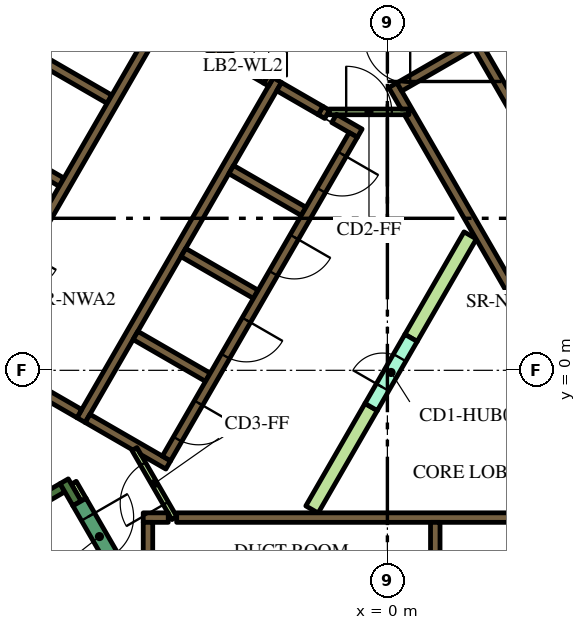
"""IFC4 building model, lengths in metres.
Left out: names, types, materials, properties, quantities, classifications, styles, units other than length and angle.
Written with IfcOpenShell. Run it as: python <this file> out.ifc"""

import sys

from ifc_helpers import new_model, si_unit, direction, frame, frame_2d, origin, place, context, subcontext, project, spatial, polyline, rectangle, outline, extrude, element, fill, save


model = new_model("IFC4")
c1 = context("Model", 3, precision=1e-05, world=origin(), true_north=direction((0.0, 1.0)))
c2 = subcontext(c1, "Body", "Model", "MODEL_VIEW")
j1 = project(units=[si_unit("LENGTHUNIT", "METRE"), si_unit("PLANEANGLEUNIT", "RADIAN")], contexts=[c1])
p1 = place(None, origin())
s1 = spatial("IfcSite", under=j1, at=p1, CompositionType="ELEMENT")
p2 = place(p1, origin())
s2 = spatial("IfcBuilding", under=s1, at=p2, CompositionType="ELEMENT")
p3 = place(p2, frame((0.0, 0.0, 31.5)))
s3 = spatial("IfcBuildingStorey", under=s2, at=p3, CompositionType="ELEMENT", Elevation=31.5)
p4 = place(p3, frame((-15.36, -1.503, 0.0), z_axis=(0.0, 0.0, 1.0), x_axis=(0.50000389221, 0.866023156604, 0.0)))
e1 = element("IfcWall", 1, at=p4, inside=s3, PredefinedType="SOLIDWALL", context=c2, shape_type="SweptSolid", body=[
    extrude(rectangle(XDim=21.0, YDim=0.9, at=frame_2d((10.5, 0.0))), origin(), (0.0, 0.0, 1.0), 3.9),
])
p5 = place(p3, frame((-14.44, -6.49, 0.0), z_axis=(0.0, 0.0, 1.0), x_axis=(0.866022966069, 0.500004222222, 0.0)))
e2 = element("IfcWall", 2, at=p5, inside=s3, PredefinedType="SOLIDWALL", context=c2, shape_type="SweptSolid", body=[
    extrude(rectangle(XDim=6.8, YDim=0.25, at=frame_2d((3.4, 0.0))), origin(), (0.0, 0.0, 1.0), 3.9),
])
p6 = place(p3, frame((-8.168, -3.503, 0.0), z_axis=(0.0, 0.0, 1.0), x_axis=(-0.499952099219, 0.866053057547, 0.0)))
e3 = element("IfcWall", 3, at=p6, inside=s3, PredefinedType="SOLIDWALL", context=c2, shape_type="SweptSolid", body=[
    extrude(rectangle(XDim=0.675, YDim=0.25, at=frame_2d((0.337, 0.0))), origin(), (0.0, 0.0, 1.0), 3.9),
])
p7 = place(p3, frame((-5.545, -3.875, 0.0), z_axis=(0.0, 0.0, 1.0), x_axis=(1.0, 0.0, 0.0)))
e4 = element("IfcWall", 4, at=p7, inside=s3, PredefinedType="SOLIDWALL", context=c2, shape_type="SweptSolid", body=[
    extrude(rectangle(XDim=11.97, YDim=0.25, at=frame_2d((5.985, 0.0))), origin(), (0.0, 0.0, 1.0), 3.9),
])
p8 = place(p3, frame((-6.425, -3.875, 0.0), z_axis=(0.0, 0.0, 1.0), x_axis=(1.0, 0.0, 0.0)))
e5 = element("IfcWall", 5, at=p8, inside=s3, PredefinedType="SOLIDWALL", context=c2, shape_type="SweptSolid", body=[
    extrude(rectangle(XDim=0.658, YDim=0.25, at=frame_2d((0.329, 0.0))), origin(), (0.0, 0.0, 1.0), 3.9),
])
p9 = place(p3, frame((1.26, -4.0, 0.0), z_axis=(0.0, 0.0, 1.0), x_axis=(0.0, -1.0, 0.0)))
e6 = element("IfcWall", 6, at=p9, inside=s3, PredefinedType="SOLIDWALL", context=c2, shape_type="SweptSolid", body=[
    extrude(rectangle(XDim=2.2, YDim=0.25, at=frame_2d((1.1, 0.0))), origin(), (0.0, 0.0, 1.0), 3.9),
])
p10 = place(p3, frame((-6.3, -4.0, 0.0), z_axis=(0.0, 0.0, 1.0), x_axis=(0.0, -1.0, 0.0)))
e7 = element("IfcWall", 7, at=p10, inside=s3, PredefinedType="SOLIDWALL", context=c2, shape_type="SweptSolid", body=[
    extrude(rectangle(XDim=3.154, YDim=0.25, at=frame_2d((1.577, 0.0))), origin(), (0.0, 0.0, 1.0), 3.9),
])
p11 = place(p3, origin())
e8 = element("IfcWall", 8, at=p11, inside=s3, PredefinedType="SOLIDWALL", context=c2, shape_type="SweptSolid", body=[
    extrude(outline(polyline([(0.566, 6.725), (0.566, 6.875), (0.566, 6.875), (0.565, 6.875), (0.361, 6.875), (0.035, 7.439), (0.252, 7.564), (0.377, 7.348), (6.552, -3.348), (6.677, -3.564), (6.46, -3.689), (0.448, 6.725), (0.565, 6.725), (0.566, 6.725), (0.566, 6.725)])), origin(), (0.0, 0.0, 1.0), 3.9),
])
p12 = place(p3, frame((0.314, 7.456, 0.0), z_axis=(0.0, 0.0, 1.0), x_axis=(0.866013897511, 0.50001992892, 0.0)))
e9 = element("IfcWall", 9, at=p12, inside=s3, PredefinedType="SOLIDWALL", context=c2, shape_type="SweptSolid", body=[
    extrude(rectangle(XDim=3.268, YDim=0.25, at=frame_2d((1.634, 0.0))), origin(), (0.0, 0.0, 1.0), 3.9),
])
p13 = place(p3, frame((-8.06, -1.311, 0.0), z_axis=(0.0, 0.0, 1.0), x_axis=(0.50000273126, 0.866023826885, 0.0)))
e10 = element("IfcWall", 10, at=p13, inside=s3, PredefinedType="SOLIDWALL", context=c2, shape_type="SweptSolid", body=[
    extrude(rectangle(XDim=10.33, YDim=0.25, at=frame_2d((5.165, 0.0))), origin(), (0.0, 0.0, 1.0), 3.9),
])
p14 = place(p3, frame((-1.758, 6.835, 0.0), z_axis=(0.0, 0.0, 1.0), x_axis=(0.865982457891, -0.500074377092, 0.0)))
e11 = element("IfcWall", 11, at=p14, inside=s3, PredefinedType="SOLIDWALL", context=c2, shape_type="SweptSolid", body=[
    extrude(rectangle(XDim=0.2, YDim=0.25, at=frame_2d((0.1, 0.0))), origin(), (0.0, 0.0, 1.0), 3.9),
])
p15 = place(p3, frame((-1.76, 6.836, 0.0), z_axis=(0.0, 0.0, 1.0), x_axis=(-0.865952863304, 0.500125622755, 0.0)))
e12 = element("IfcWall", 12, at=p15, inside=s3, PredefinedType="SOLIDWALL", context=c2, shape_type="SweptSolid", body=[
    extrude(rectangle(XDim=1.258, YDim=0.25, at=frame_2d((0.629, 0.0))), origin(), (0.0, 0.0, 1.0), 3.9),
])
p16 = place(p3, frame((-0.728, 6.24, 0.0), z_axis=(0.0, 0.0, 1.0), x_axis=(-0.865955664968, 0.500120771724, 0.0)))
e13 = element("IfcWall", 13, at=p16, inside=s3, PredefinedType="SOLIDWALL", context=c2, shape_type="SweptSolid", body=[
    extrude(rectangle(XDim=0.778, YDim=0.25, at=frame_2d((0.389, 0.0))), origin(), (0.0, 0.0, 1.0), 3.9),
])
for number, where, z_axis, x_axis in (
    (14, (-2.204, 4.182, 0.0), (0.0, 0.0, 1.0), (-0.866, 0.5, 0.0)),
    (15, (-5.369, 3.1, 0.0), (0.0, 0.0, 1.0), (0.866, -0.5, 0.0)),
    (16, (-4.724, -0.182, 0.0), (0.0, 0.0, 1.0), (-0.866, 0.5, 0.0)),
):
    element("IfcWall", number, at=place(p3, frame(where, z_axis=z_axis, x_axis=x_axis)), inside=s3, PredefinedType="SOLIDWALL", context=c2, shape_type="SweptSolid", body=[
        extrude(rectangle(XDim=2.2, YDim=0.25, at=frame_2d((1.1, 0.0))), origin(), (0.0, 0.0, 1.0), 3.9),
    ])
e17 = element("IfcWall", 17, at=p11, inside=s3, PredefinedType="SOLIDWALL", context=c2, shape_type="SweptSolid", body=[
    extrude(outline(polyline([(-5.922, -2.257), (-5.922, -2.257), (-5.705, -2.382), (-5.83, -2.598), (-6.483, -2.221), (-6.591, -2.033), (-6.591, -2.033), (-6.7, -2.096), (-7.952, -1.373), (-7.827, -1.156), (-5.922, -2.257)])), origin(), (0.0, 0.0, 1.0), 3.9),
])
p17 = place(p3, frame((-8.106, -1.14, 0.0), z_axis=(0.0, 0.0, 1.0), x_axis=(-0.866000643155, 0.500042884217, 0.0)))
e18 = element("IfcWall", 18, at=p17, inside=s3, PredefinedType="SOLIDWALL", context=c2, shape_type="SweptSolid", body=[
    extrude(rectangle(XDim=5.65, YDim=0.25, at=frame_2d((2.825, 0.0))), origin(), (0.0, 0.0, 1.0), 3.9),
])
e19 = element("IfcWall", 19, at=p11, inside=s3, PredefinedType="SOLIDWALL", context=c2, shape_type="SweptSolid", body=[
    extrude(outline(polyline([(-3.128, 7.481), (-3.259, 7.557), (-3.134, 7.773), (-3.003, 7.698), (-3.128, 7.481)])), origin(), (0.0, 0.0, 1.0), 3.9),
])
for number, where, z_axis, x_axis in (
    (20, (-8.574, 4.95, 0.0), (0.0, 0.0, 1.0), (-0.866, 0.5, 0.0)),
    (21, (-7.314, 7.132, 0.0), (0.0, 0.0, 1.0), (-0.866, 0.5, 0.0)),
):
    element("IfcWall", number, at=place(p3, frame(where, z_axis=z_axis, x_axis=x_axis)), inside=s3, PredefinedType="SOLIDWALL", context=c2, shape_type="SweptSolid", body=[
        extrude(rectangle(XDim=2.2, YDim=0.25, at=frame_2d((1.1, 0.0))), origin(), (0.0, 0.0, 1.0), 3.9),
    ])
p18 = place(p3, frame((-7.959, 10.415, 0.0), z_axis=(0.0, 0.0, 1.0), x_axis=(0.866020958405, -0.500007699544, 0.0)))
e22 = element("IfcWall", 22, at=p18, inside=s3, PredefinedType="SOLIDWALL", context=c2, shape_type="SweptSolid", body=[
    extrude(rectangle(XDim=4.1, YDim=0.25, at=frame_2d((2.05, 0.0))), origin(), (0.0, 0.0, 1.0), 3.9),
])
p19 = place(p3, frame((-8.252, -2.958, 0.0), z_axis=(0.0, 0.0, 1.0), x_axis=(0.500174715838, -0.865924508047, 0.0)))
e23 = element("IfcWall", 23, at=p19, inside=s3, PredefinedType="PARTITIONING", context=c2, shape_type="SweptSolid", body=[
    extrude(rectangle(XDim=0.514, YDim=0.15, at=frame_2d((0.257, 0.0))), origin(), (0.0, 0.0, 1.0), 2.75),
])
e24 = element("IfcWall", 24, at=p11, inside=s3, PredefinedType="PARTITIONING", context=c2, shape_type="SweptSolid", body=[
    extrude(outline(polyline([(-0.59, -0.872), (-0.265, -1.059), (-1.822, -3.756), (-2.147, -3.568), (-0.59, -0.872)])), origin(), (0.0, 0.0, 1.0), 2.75),
])
e25 = element("IfcWall", 25, at=p11, inside=s3, PredefinedType="PARTITIONING", context=c2, shape_type="SweptSolid", body=[
    extrude(outline(polyline([(2.017, 3.643), (2.342, 3.456), (0.785, 0.76), (0.46, 0.947), (2.017, 3.643)])), origin(), (0.0, 0.0, 1.0), 2.75),
])
p20 = place(p3, frame((8.565, -2.185, 0.0), z_axis=(0.0, 0.0, 1.0), x_axis=(-0.499997954832, 0.866026584559, 0.0)))
e26 = element("IfcWall", 26, at=p20, inside=s3, PredefinedType="SOLIDWALL", context=c2, shape_type="SweptSolid", body=[
    extrude(rectangle(XDim=12.35, YDim=0.25, at=frame_2d((6.175, 0.0))), origin(), (0.0, 0.0, 1.0), 3.9),
])
p21 = place(p20, frame((5.725, 0.0, 0.0)))
e27 = element("IfcOpeningElement", 27, at=p21, cuts=e26, PredefinedType="OPENING", context=c2, shape_type="SweptSolid", body=[
    extrude(rectangle(XDim=0.9, YDim=2.1, at=frame_2d((0.45, 1.05))), frame((0.0, 0.135, 0.0), z_axis=(0.0, -1.0, 0.0), x_axis=(1.0, 0.0, 0.0)), (0.0, 0.0, 1.0), 0.27),
])
p22 = place(p3, frame((-6.008, 9.144, 0.0), z_axis=(0.0, 0.0, 1.0), x_axis=(-0.500006956611, -0.866021387346, 0.0)))
e28 = element("IfcWall", 28, at=p22, inside=s3, PredefinedType="SOLIDWALL", context=c2, shape_type="SweptSolid", body=[
    extrude(rectangle(XDim=9.83, YDim=0.25, at=frame_2d((4.915, 0.0))), origin(), (0.0, 0.0, 1.0), 3.9),
])
p23 = place(p22, frame((6.985, 0.0, 0.0)))
e29 = element("IfcOpeningElement", 29, at=p23, cuts=e28, PredefinedType="OPENING", context=c2, shape_type="SweptSolid", body=[
    extrude(rectangle(XDim=0.9, YDim=2.1, at=frame_2d((0.45, 1.05))), frame((0.0, 0.135, 0.0), z_axis=(0.0, -1.0, 0.0), x_axis=(1.0, 0.0, 0.0)), (0.0, 0.0, 1.0), 0.27),
])
p24 = place(p3, frame((-0.898, 6.194, 0.0), z_axis=(0.0, 0.0, 1.0), x_axis=(-0.499996202215, -0.866027596426, 0.0)))
e30 = element("IfcWall", 30, at=p24, inside=s3, PredefinedType="SOLIDWALL", context=c2, shape_type="SweptSolid", body=[
    extrude(rectangle(XDim=9.83, YDim=0.25, at=frame_2d((4.915, 0.0))), origin(), (0.0, 0.0, 1.0), 3.9),
])
p25 = place(p24, frame((0.585, 0.0, 0.0)))
e31 = element("IfcOpeningElement", 31, at=p25, cuts=e30, PredefinedType="OPENING", context=c2, shape_type="SweptSolid", body=[
    extrude(rectangle(XDim=1.1, YDim=2.1, at=frame_2d((0.55, 1.05))), frame((0.0, 0.135, 0.0), z_axis=(0.0, -1.0, 0.0), x_axis=(1.0, 0.0, 0.0)), (0.0, 0.0, 1.0), 0.27),
])
p26 = place(p24, frame((3.105, 0.0, 0.0)))
e32 = element("IfcOpeningElement", 32, at=p26, cuts=e30, PredefinedType="OPENING", context=c2, shape_type="SweptSolid", body=[
    extrude(rectangle(XDim=1.1, YDim=2.1, at=frame_2d((0.55, 1.05))), frame((0.0, 0.135, 0.0), z_axis=(0.0, -1.0, 0.0), x_axis=(1.0, 0.0, 0.0)), (0.0, 0.0, 1.0), 0.27),
])
p27 = place(p24, frame((5.625, 0.0, 0.0)))
e33 = element("IfcOpeningElement", 33, at=p27, cuts=e30, PredefinedType="OPENING", context=c2, shape_type="SweptSolid", body=[
    extrude(rectangle(XDim=1.1, YDim=2.1, at=frame_2d((0.55, 1.05))), frame((0.0, 0.135, 0.0), z_axis=(0.0, -1.0, 0.0), x_axis=(1.0, 0.0, 0.0)), (0.0, 0.0, 1.0), 0.27),
])
p28 = place(p24, frame((8.145, 0.0, 0.0)))
e34 = element("IfcOpeningElement", 34, at=p28, cuts=e30, PredefinedType="OPENING", context=c2, shape_type="SweptSolid", body=[
    extrude(rectangle(XDim=1.1, YDim=2.1, at=frame_2d((0.55, 1.05))), frame((0.0, 0.135, 0.0), z_axis=(0.0, -1.0, 0.0), x_axis=(1.0, 0.0, 0.0)), (0.0, 0.0, 1.0), 0.27),
])
p29 = place(p3, frame((-8.103, -3.466, 0.0), z_axis=(0.0, 0.0, 1.0), x_axis=(0.500078061341, -0.865980330357, 0.0)))
e35 = element("IfcWall", 35, at=p29, inside=s3, PredefinedType="SOLIDWALL", context=c2, shape_type="SweptSolid", body=[
    extrude(rectangle(XDim=2.1, YDim=0.4, at=frame_2d((1.05, 0.0))), origin(), (0.0, 0.0, 1.0), 3.9),
])
p30 = place(p29, frame((0.45, 0.0, 0.0)))
e36 = element("IfcOpeningElement", 36, at=p30, cuts=e35, PredefinedType="OPENING", context=c2, shape_type="SweptSolid", body=[
    extrude(rectangle(XDim=1.2, YDim=2.1, at=frame_2d((0.6, 1.05))), frame((0.0, 0.21, 0.0), z_axis=(0.0, -1.0, 0.0), x_axis=(1.0, 0.0, 0.0)), (0.0, 0.0, 1.0), 0.42),
])
p31 = place(p3, frame((-0.427, -0.966, 0.0), z_axis=(0.0, 0.0, 1.0), x_axis=(0.49994051562, 0.866059744384, 0.0)))
e37 = element("IfcWall", 37, at=p31, inside=s3, PredefinedType="PARTITIONING", context=c2, shape_type="SweptSolid", body=[
    extrude(rectangle(XDim=2.1, YDim=0.375, at=frame_2d((1.05, 0.0))), origin(), (0.0, 0.0, 1.0), 2.75),
])
p32 = place(p31, frame((0.6, 0.0, 0.0)))
e38 = element("IfcOpeningElement", 38, at=p32, cuts=e37, PredefinedType="OPENING", context=c2, shape_type="SweptSolid", body=[
    extrude(rectangle(XDim=0.9, YDim=2.1, at=frame_2d((0.45, 1.05))), frame((0.0, 0.198, 0.0), z_axis=(0.0, -1.0, 0.0), x_axis=(1.0, 0.0, 0.0)), (0.0, 0.0, 1.0), 0.395),
])
p33 = place(p3, frame((-1.534, 6.8, 0.0), z_axis=(0.0, 0.0, 1.0), x_axis=(1.0, 0.0, 0.0)))
e39 = element("IfcWall", 39, at=p33, inside=s3, PredefinedType="PARTITIONING", context=c2, shape_type="SweptSolid", body=[
    extrude(rectangle(XDim=2.1, YDim=0.15, at=frame_2d((1.05, 0.0))), origin(), (0.0, 0.0, 1.0), 2.75),
])
p34 = place(p33, frame((0.45, 0.0, 0.0)))
e40 = element("IfcOpeningElement", 40, at=p34, cuts=e39, PredefinedType="OPENING", context=c2, shape_type="SweptSolid", body=[
    extrude(rectangle(XDim=1.2, YDim=2.1, at=frame_2d((0.6, 1.05))), frame((0.0, 0.085, 0.0), z_axis=(0.0, -1.0, 0.0), x_axis=(1.0, 0.0, 0.0)), (0.0, 0.0, 1.0), 0.17),
])
p35 = place(p3, frame((-5.606, -3.89, 0.0), z_axis=(0.0, 0.0, 1.0), x_axis=(-0.500027713859, 0.866009402589, 0.0)))
e41 = element("IfcWall", 41, at=p35, inside=s3, PredefinedType="PARTITIONING", context=c2, shape_type="SweptSolid", body=[
    extrude(rectangle(XDim=2.1, YDim=0.15, at=frame_2d((1.05, 0.0))), origin(), (0.0, 0.0, 1.0), 2.75),
])
p36 = place(p35, frame((0.45, 0.0, 0.0)))
e42 = element("IfcOpeningElement", 42, at=p36, cuts=e41, PredefinedType="OPENING", context=c2, shape_type="SweptSolid", body=[
    extrude(rectangle(XDim=1.2, YDim=2.1, at=frame_2d((0.6, 1.05))), frame((0.0, 0.085, 0.0), z_axis=(0.0, -1.0, 0.0), x_axis=(1.0, 0.0, 0.0)), (0.0, 0.0, 1.0), 0.17),
])
p37 = place(p3, frame((-4.409, 8.365, 0.0), z_axis=(0.0, 0.0, 1.0), x_axis=(0.866034573852, -0.49998411664, 0.0)))
e43 = element("IfcWall", 43, at=p37, inside=s3, PredefinedType="SOLIDWALL", context=c2, shape_type="SweptSolid", body=[
    extrude(rectangle(XDim=1.4, YDim=0.25, at=frame_2d((0.7, 0.0))), origin(), (0.0, 0.0, 1.0), 3.9),
])
p38 = place(p37, frame((0.1, 0.0, 0.0)))
e44 = element("IfcOpeningElement", 44, at=p38, cuts=e43, PredefinedType="OPENING", context=c2, shape_type="SweptSolid", body=[
    extrude(rectangle(XDim=1.2, YDim=2.1, at=frame_2d((0.6, 1.05))), frame((0.0, 0.135, 0.0), z_axis=(0.0, -1.0, 0.0), x_axis=(1.0, 0.0, 0.0)), (0.0, 0.0, 1.0), 0.27),
])
p39 = place(p3, frame((-19.081, -3.9, 0.0), z_axis=(0.0, 0.0, 1.0), x_axis=(0.499998313975, 0.866026377209, 0.0)))
e45 = element("IfcWall", 45, at=p39, inside=s3, PredefinedType="PARTITIONING", context=c2, shape_type="SweptSolid", body=[
    extrude(rectangle(XDim=25.766, YDim=0.15, at=frame_2d((12.883, 0.0))), origin(), (0.0, 0.0, 1.0), 2.75),
])
p40 = place(p39, frame((24.586, 0.0, 0.0)))
e46 = element("IfcOpeningElement", 46, at=p40, cuts=e45, PredefinedType="OPENING", context=c2, shape_type="SweptSolid", body=[
    extrude(rectangle(XDim=1.0, YDim=2.1, at=frame_2d((0.5, 1.05))), frame((0.0, 0.085, 0.0), z_axis=(0.0, -1.0, 0.0), x_axis=(1.0, 0.0, 0.0)), (0.0, 0.0, 1.0), 0.17),
])
p41 = place(p39, frame((16.196, 0.0, 0.0)))
e47 = element("IfcOpeningElement", 47, at=p41, cuts=e45, PredefinedType="OPENING", context=c2, shape_type="SweptSolid", body=[
    extrude(rectangle(XDim=1.0, YDim=2.1, at=frame_2d((0.5, 1.05))), frame((0.0, 0.085, 0.0), z_axis=(0.0, -1.0, 0.0), x_axis=(1.0, 0.0, 0.0)), (0.0, 0.0, 1.0), 0.17),
])
p42 = place(p39, frame((14.789, 0.0, 0.0)))
e48 = element("IfcOpeningElement", 48, at=p42, cuts=e45, PredefinedType="OPENING", context=c2, shape_type="SweptSolid", body=[
    extrude(rectangle(XDim=1.1, YDim=2.1, at=frame_2d((0.55, 1.05))), frame((0.0, 0.085, 0.0), z_axis=(0.0, -1.0, 0.0), x_axis=(1.0, 0.0, 0.0)), (0.0, 0.0, 1.0), 0.17),
])
p43 = place(p39, frame((3.698, 0.0, 0.0)))
e49 = element("IfcOpeningElement", 49, at=p43, cuts=e45, PredefinedType="OPENING", context=c2, shape_type="SweptSolid", body=[
    extrude(rectangle(XDim=1.0, YDim=2.1, at=frame_2d((0.5, 1.05))), frame((0.0, 0.085, 0.0), z_axis=(0.0, -1.0, 0.0), x_axis=(1.0, 0.0, 0.0)), (0.0, 0.0, 1.0), 0.17),
])
p44 = place(p39, frame((1.531, 0.0, 0.0)))
e50 = element("IfcOpeningElement", 50, at=p44, cuts=e45, PredefinedType="OPENING", context=c2, shape_type="SweptSolid", body=[
    extrude(rectangle(XDim=0.9, YDim=2.1, at=frame_2d((0.45, 1.05))), frame((0.0, 0.085, 0.0), z_axis=(0.0, -1.0, 0.0), x_axis=(1.0, 0.0, 0.0)), (0.0, 0.0, 1.0), 0.17),
])
p45 = place(p25, origin())
e51 = element("IfcDoor", 51, at=p45, inside=s3, OperationType="DOUBLE_DOOR_SLIDING", PredefinedType="DOOR", context=c2, shape_type="SweptSolid", body=[
    extrude(rectangle(XDim=1.1, YDim=2.1, at=frame_2d((0.55, 1.05))), frame((0.0, 0.025, 0.0), z_axis=(0.0, -1.0, 0.0), x_axis=(1.0, 0.0, 0.0)), (0.0, 0.0, 1.0), 0.05),
])
fill(e31, e51)
p46 = place(p26, origin())
e52 = element("IfcDoor", 52, at=p46, inside=s3, OperationType="DOUBLE_DOOR_SLIDING", PredefinedType="DOOR", context=c2, shape_type="SweptSolid", body=[
    extrude(rectangle(XDim=1.1, YDim=2.1, at=frame_2d((0.55, 1.05))), frame((0.0, 0.025, 0.0), z_axis=(0.0, -1.0, 0.0), x_axis=(1.0, 0.0, 0.0)), (0.0, 0.0, 1.0), 0.05),
])
fill(e32, e52)
p47 = place(p27, origin())
e53 = element("IfcDoor", 53, at=p47, inside=s3, OperationType="DOUBLE_DOOR_SLIDING", PredefinedType="DOOR", context=c2, shape_type="SweptSolid", body=[
    extrude(rectangle(XDim=1.1, YDim=2.1, at=frame_2d((0.55, 1.05))), frame((0.0, 0.025, 0.0), z_axis=(0.0, -1.0, 0.0), x_axis=(1.0, 0.0, 0.0)), (0.0, 0.0, 1.0), 0.05),
])
fill(e33, e53)
p48 = place(p28, origin())
e54 = element("IfcDoor", 54, at=p48, inside=s3, OperationType="DOUBLE_DOOR_SLIDING", PredefinedType="DOOR", context=c2, shape_type="SweptSolid", body=[
    extrude(rectangle(XDim=1.1, YDim=2.1, at=frame_2d((0.55, 1.05))), frame((0.0, 0.025, 0.0), z_axis=(0.0, -1.0, 0.0), x_axis=(1.0, 0.0, 0.0)), (0.0, 0.0, 1.0), 0.05),
])
fill(e34, e54)
p49 = place(p30, origin())
e55 = element("IfcDoor", 55, at=p49, inside=s3, OperationType="SINGLE_SWING_LEFT", PredefinedType="DOOR", context=c2, shape_type="SweptSolid", body=[
    extrude(rectangle(XDim=1.2, YDim=2.1, at=frame_2d((0.6, 1.05))), frame((0.0, 0.025, 0.0), z_axis=(0.0, -1.0, 0.0), x_axis=(1.0, 0.0, 0.0)), (0.0, 0.0, 1.0), 0.05),
])
fill(e36, e55)
p50 = place(p32, origin())
e56 = element("IfcDoor", 56, at=p50, inside=s3, OperationType="SINGLE_SWING_LEFT", PredefinedType="DOOR", context=c2, shape_type="SweptSolid", body=[
    extrude(rectangle(XDim=0.9, YDim=2.1, at=frame_2d((0.45, 1.05))), frame((0.0, 0.025, 0.0), z_axis=(0.0, -1.0, 0.0), x_axis=(1.0, 0.0, 0.0)), (0.0, 0.0, 1.0), 0.05),
])
fill(e38, e56)
p51 = place(p34, origin())
e57 = element("IfcDoor", 57, at=p51, inside=s3, OperationType="SINGLE_SWING_LEFT", PredefinedType="DOOR", context=c2, shape_type="SweptSolid", body=[
    extrude(rectangle(XDim=1.2, YDim=2.1, at=frame_2d((0.6, 1.05))), frame((0.0, 0.025, 0.0), z_axis=(0.0, -1.0, 0.0), x_axis=(1.0, 0.0, 0.0)), (0.0, 0.0, 1.0), 0.05),
])
fill(e40, e57)
p52 = place(p36, origin())
e58 = element("IfcDoor", 58, at=p52, inside=s3, OperationType="SINGLE_SWING_LEFT", PredefinedType="DOOR", context=c2, shape_type="SweptSolid", body=[
    extrude(rectangle(XDim=1.2, YDim=2.1, at=frame_2d((0.6, 1.05))), frame((0.0, 0.025, 0.0), z_axis=(0.0, -1.0, 0.0), x_axis=(1.0, 0.0, 0.0)), (0.0, 0.0, 1.0), 0.05),
])
fill(e42, e58)
p53 = place(p38, origin())
e59 = element("IfcDoor", 59, at=p53, inside=s3, OperationType="SINGLE_SWING_LEFT", PredefinedType="DOOR", context=c2, shape_type="SweptSolid", body=[
    extrude(rectangle(XDim=1.2, YDim=2.1, at=frame_2d((0.6, 1.05))), frame((0.0, 0.025, 0.0), z_axis=(0.0, -1.0, 0.0), x_axis=(1.0, 0.0, 0.0)), (0.0, 0.0, 1.0), 0.05),
])
fill(e44, e59)
save(model, sys.argv[1])
